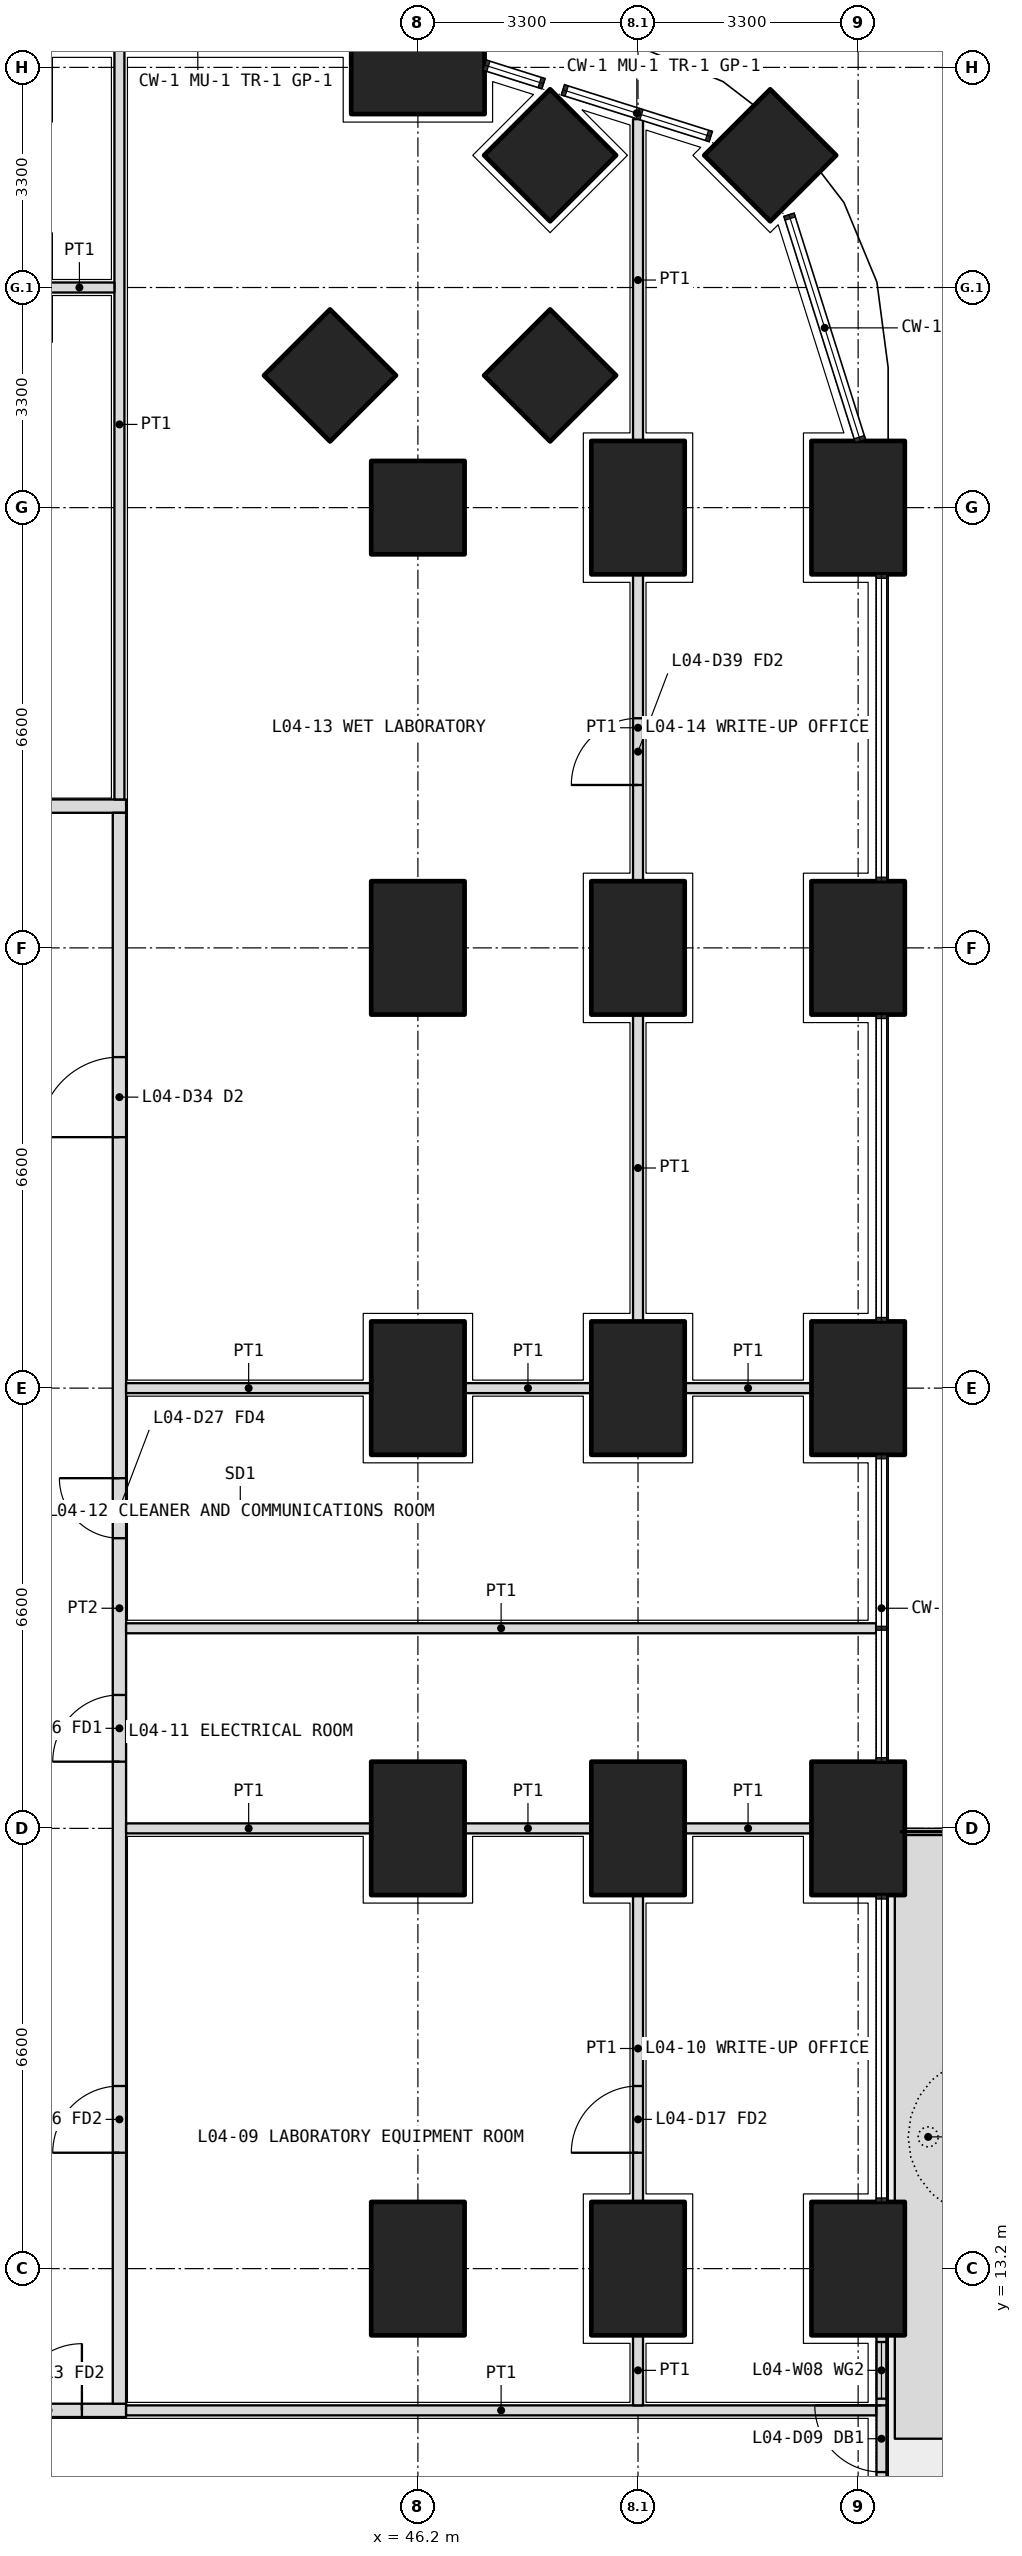
"""IFC4 building model, lengths in metres.
Left out: names, types, materials, properties, quantities, classifications, styles, units other than length and angle.
Written with IfcOpenShell. Run it as: python <this file> out.ifc"""

import sys

from ifc_helpers import new_model, si_unit, direction, frame, frame_2d, origin, origin_2d, place, context, subcontext, project, spatial, polyline, rectangle, outline, extrude, element, fill, save


model = new_model("IFC4")
c1 = context("Model", 3, precision=1e-05, world=origin(), true_north=direction((0.0, 1.0)))
c2 = subcontext(c1, "Body", "Model", "MODEL_VIEW")
j1 = project(units=[si_unit("LENGTHUNIT", "METRE"), si_unit("PLANEANGLEUNIT", "RADIAN")], contexts=[c1])
p1 = place(None, origin())
s1 = spatial("IfcSite", under=j1, at=p1, CompositionType="ELEMENT")
p2 = place(p1, origin())
s2 = spatial("IfcBuilding", under=s1, at=p2, CompositionType="ELEMENT")
p3 = place(p2, frame((0.0, 0.0, 21.3)))
s3 = spatial("IfcBuildingStorey", under=s2, at=p3, CompositionType="ELEMENT", Elevation=21.3)
p4 = place(p3, frame((51.482, 44.882, 0.0), z_axis=(0.0, 0.0, 1.0), x_axis=(0.707106781187, 0.707106781187, 0.0)))
e1 = element("IfcColumn", 1, at=p4, inside=s3, PredefinedType="COLUMN", context=c2, shape_type="SweptSolid", body=[
    extrude(rectangle(XDim=1.4, YDim=1.4, at=origin_2d()), origin(), (0.0, 0.0, 1.0), 4.2),
])
for number, where, z_axis, x_axis in (
    (2, (52.8, 13.2, 0.0), (0.0, 0.0, 1.0), (0.0, 1.0, 0.0)),
    (3, (52.8, 19.8, 0.0), (0.0, 0.0, 1.0), (0.0, 1.0, 0.0)),
    (4, (52.8, 26.4, 0.0), (0.0, 0.0, 1.0), (0.0, 1.0, 0.0)),
    (5, (52.8, 33.0, 0.0), (0.0, 0.0, 1.0), (0.0, 1.0, 0.0)),
    (6, (52.8, 39.6, 0.0), (0.0, 0.0, 1.0), (0.0, 1.0, 0.0)),
    (7, (46.2, 46.2, 0.0), (0.0, 0.0, 1.0), (1.0, 0.0, 0.0)),
):
    element("IfcColumn", number, at=place(p3, frame(where, z_axis=z_axis, x_axis=x_axis)), inside=s3, PredefinedType="COLUMN", context=c2, shape_type="SweptSolid", body=[
        extrude(rectangle(XDim=2.0, YDim=1.4, at=origin_2d()), origin(), (0.0, 0.0, 1.0), 4.2),
    ])
for number, where, z_axis, x_axis in (
    (8, (46.2, 39.6, 0.0), (0.0, 0.0, 1.0), (1.0, 0.0, 0.0)),
    (9, (48.182, 44.882, 0.0), (0.0, 0.0, 1.0), (0.707, 0.707, 0.0)),
):
    element("IfcColumn", number, at=place(p3, frame(where, z_axis=z_axis, x_axis=x_axis)), inside=s3, PredefinedType="COLUMN", context=c2, shape_type="SweptSolid", body=[
        extrude(rectangle(XDim=1.4, YDim=1.4, at=origin_2d()), origin(), (0.0, 0.0, 1.0), 4.2),
    ])
for number, where, z_axis, x_axis in (
    (10, (49.5, 13.2, 0.0), (0.0, 0.0, 1.0), (0.0, 1.0, 0.0)),
    (11, (49.5, 19.8, 0.0), (0.0, 0.0, 1.0), (0.0, 1.0, 0.0)),
    (12, (49.5, 26.4, 0.0), (0.0, 0.0, 1.0), (0.0, 1.0, 0.0)),
    (13, (49.5, 33.0, 0.0), (0.0, 0.0, 1.0), (0.0, 1.0, 0.0)),
    (14, (49.5, 39.6, 0.0), (0.0, 0.0, 1.0), (0.0, 1.0, 0.0)),
):
    element("IfcColumn", number, at=place(p3, frame(where, z_axis=z_axis, x_axis=x_axis)), inside=s3, PredefinedType="COLUMN", context=c2, shape_type="SweptSolid", body=[
        extrude(rectangle(XDim=2.0, YDim=1.4, at=origin_2d()), origin(), (0.0, 0.0, 1.0), 4.2),
    ])
for number, where, z_axis, x_axis in (
    (15, (48.182, 41.582, 0.0), (0.0, 0.0, 1.0), (0.707, 0.707, 0.0)),
    (16, (44.882, 41.582, 0.0), (0.0, 0.0, 1.0), (0.707, 0.707, 0.0)),
):
    element("IfcColumn", number, at=place(p3, frame(where, z_axis=z_axis, x_axis=x_axis)), inside=s3, PredefinedType="COLUMN", context=c2, shape_type="SweptSolid", body=[
        extrude(rectangle(XDim=1.4, YDim=1.4, at=origin_2d()), origin(), (0.0, 0.0, 1.0), 4.2),
    ])
for number, where, z_axis, x_axis in (
    (17, (46.2, 13.2, 0.0), (0.0, 0.0, 1.0), (0.0, 1.0, 0.0)),
    (18, (46.2, 19.8, 0.0), (0.0, 0.0, 1.0), (0.0, 1.0, 0.0)),
    (19, (46.2, 26.4, 0.0), (0.0, 0.0, 1.0), (0.0, 1.0, 0.0)),
    (20, (46.2, 33.0, 0.0), (0.0, 0.0, 1.0), (0.0, 1.0, 0.0)),
):
    element("IfcColumn", number, at=place(p3, frame(where, z_axis=z_axis, x_axis=x_axis)), inside=s3, PredefinedType="COLUMN", context=c2, shape_type="SweptSolid", body=[
        extrude(rectangle(XDim=2.0, YDim=1.4, at=origin_2d()), origin(), (0.0, 0.0, 1.0), 4.2),
    ])
p5 = place(p3, origin())
e21 = element("IfcWall", 21, at=p5, inside=s3, PredefinedType="USERDEFINED", context=c2, shape_type="SweptSolid", body=[
    extrude(outline(polyline([(53.35, 10.65), (54.35, 10.65), (54.35, 19.7), (53.35, 19.7), (53.35, 10.65)]), holes=[polyline([(53.5, 10.8), (54.2, 10.8), (54.2, 19.55), (53.5, 19.55), (53.5, 10.8)])]), origin(), (0.0, 0.0, 1.0), 1.05),
])
p6 = place(p3, frame((53.15, 7.6, 0.0), z_axis=(0.0, 0.0, 1.0), x_axis=(0.0, 1.0, 0.0)))
e22 = element("IfcWall", 22, at=p6, inside=s3, PredefinedType="SOLIDWALL", context=c2, shape_type="SweptSolid", body=[
    extrude(rectangle(XDim=4.6, YDim=0.15, at=frame_2d((2.3, 0.0))), origin(), (0.0, 0.0, 1.0), 2.7),
])
p7 = place(p6, frame((2.55, 0.0, 0.0)))
e23 = element("IfcOpeningElement", 23, at=p7, cuts=e22, PredefinedType="OPENING", context=c2, shape_type="SweptSolid", body=[
    extrude(rectangle(XDim=1.0, YDim=2.4, at=frame_2d((0.5, 1.2))), frame((0.0, 0.085, 0.0), z_axis=(0.0, -1.0, 0.0), x_axis=(1.0, 0.0, 0.0)), (0.0, 0.0, 1.0), 0.17),
])
p8 = place(p6, frame((0.1, 0.0, 0.1)))
e24 = element("IfcOpeningElement", 24, at=p8, cuts=e22, PredefinedType="OPENING", context=c2, shape_type="SweptSolid", body=[
    extrude(rectangle(XDim=1.95, YDim=2.3, at=frame_2d((0.975, 1.15))), frame((0.0, 0.085, 0.0), z_axis=(0.0, -1.0, 0.0), x_axis=(1.0, 0.0, 0.0)), (0.0, 0.0, 1.0), 0.17),
])
p9 = place(p6, frame((3.65, 0.0, 0.1)))
e25 = element("IfcOpeningElement", 25, at=p9, cuts=e22, PredefinedType="OPENING", context=c2, shape_type="SweptSolid", body=[
    extrude(rectangle(XDim=0.85, YDim=2.3, at=frame_2d((0.425, 1.15))), frame((0.0, 0.085, 0.0), z_axis=(0.0, -1.0, 0.0), x_axis=(1.0, 0.0, 0.0)), (0.0, 0.0, 1.0), 0.17),
])
p10 = place(p3, frame((33.0, 11.075, 0.0), z_axis=(0.0, 0.0, 1.0), x_axis=(1.0, 0.0, 0.0)))
e26 = element("IfcWall", 26, at=p10, inside=s3, PredefinedType="PARTITIONING", context=c2, shape_type="SweptSolid", body=[
    extrude(rectangle(XDim=8.825, YDim=0.2, at=frame_2d((4.413, 0.0))), origin(), (0.0, 0.0, 1.0), 2.85),
])
p11 = place(p10, frame((1.2, 0.0, 0.0)))
e27 = element("IfcOpeningElement", 27, at=p11, cuts=e26, PredefinedType="OPENING", context=c2, shape_type="SweptSolid", body=[
    extrude(rectangle(XDim=1.0, YDim=2.1, at=frame_2d((0.5, 1.05))), frame((0.0, 0.11, 0.0), z_axis=(0.0, -1.0, 0.0), x_axis=(1.0, 0.0, 0.0)), (0.0, 0.0, 1.0), 0.22),
])
p12 = place(p10, frame((4.5, 0.0, 0.0)))
e28 = element("IfcOpeningElement", 28, at=p12, cuts=e26, PredefinedType="OPENING", context=c2, shape_type="SweptSolid", body=[
    extrude(rectangle(XDim=1.0, YDim=2.1, at=frame_2d((0.5, 1.05))), frame((0.0, 0.11, 0.0), z_axis=(0.0, -1.0, 0.0), x_axis=(1.0, 0.0, 0.0)), (0.0, 0.0, 1.0), 0.22),
])
p13 = place(p10, frame((7.163, 0.0, 0.0)))
e29 = element("IfcOpeningElement", 29, at=p13, cuts=e26, PredefinedType="OPENING", context=c2, shape_type="SweptSolid", body=[
    extrude(rectangle(XDim=1.0, YDim=2.1, at=frame_2d((0.5, 1.05))), frame((0.0, 0.11, 0.0), z_axis=(0.0, -1.0, 0.0), x_axis=(1.0, 0.0, 0.0)), (0.0, 0.0, 1.0), 0.22),
])
p14 = place(p3, frame((10.975, 35.125, 0.0), z_axis=(0.0, 0.0, 1.0), x_axis=(1.0, 0.0, 0.0)))
e30 = element("IfcWall", 30, at=p14, inside=s3, PredefinedType="PARTITIONING", context=c2, shape_type="SweptSolid", body=[
    extrude(rectangle(XDim=30.85, YDim=0.2, at=frame_2d((15.425, 0.0))), origin(), (0.0, 0.0, 1.0), 2.85),
])
p15 = place(p14, frame((7.262, 0.0, 0.0)))
e31 = element("IfcOpeningElement", 31, at=p15, cuts=e30, PredefinedType="OPENING", context=c2, shape_type="SweptSolid", body=[
    extrude(rectangle(XDim=1.0, YDim=2.1, at=frame_2d((0.5, 1.05))), frame((0.0, 0.11, 0.0), z_axis=(0.0, -1.0, 0.0), x_axis=(1.0, 0.0, 0.0)), (0.0, 0.0, 1.0), 0.22),
])
p16 = place(p14, frame((22.587, 0.0, 0.0)))
e32 = element("IfcOpeningElement", 32, at=p16, cuts=e30, PredefinedType="OPENING", context=c2, shape_type="SweptSolid", body=[
    extrude(rectangle(XDim=1.0, YDim=2.1, at=frame_2d((0.5, 1.05))), frame((0.0, 0.11, 0.0), z_axis=(0.0, -1.0, 0.0), x_axis=(1.0, 0.0, 0.0)), (0.0, 0.0, 1.0), 0.22),
])
p17 = place(p3, frame((41.725, 11.175, 0.0), z_axis=(0.0, 0.0, 1.0), x_axis=(0.0, 1.0, 0.0)))
e33 = element("IfcWall", 33, at=p17, inside=s3, PredefinedType="PARTITIONING", context=c2, shape_type="SweptSolid", body=[
    extrude(rectangle(XDim=23.85, YDim=0.2, at=frame_2d((11.925, 0.0))), origin(), (0.0, 0.0, 1.0), 2.85),
])
p18 = place(p17, frame((3.762, 0.0, 0.0)))
e34 = element("IfcOpeningElement", 34, at=p18, cuts=e33, PredefinedType="OPENING", context=c2, shape_type="SweptSolid", body=[
    extrude(rectangle(XDim=1.0, YDim=2.1, at=frame_2d((0.5, 1.05))), frame((0.0, 0.11, 0.0), z_axis=(0.0, -1.0, 0.0), x_axis=(1.0, 0.0, 0.0)), (0.0, 0.0, 1.0), 0.22),
])
p19 = place(p17, frame((9.625, 0.0, 0.0)))
e35 = element("IfcOpeningElement", 35, at=p19, cuts=e33, PredefinedType="OPENING", context=c2, shape_type="SweptSolid", body=[
    extrude(rectangle(XDim=1.0, YDim=2.1, at=frame_2d((0.5, 1.05))), frame((0.0, 0.11, 0.0), z_axis=(0.0, -1.0, 0.0), x_axis=(1.0, 0.0, 0.0)), (0.0, 0.0, 1.0), 0.22),
])
p20 = place(p17, frame((12.975, 0.0, 0.0)))
e36 = element("IfcOpeningElement", 36, at=p20, cuts=e33, PredefinedType="OPENING", context=c2, shape_type="SweptSolid", body=[
    extrude(rectangle(XDim=0.9, YDim=2.1, at=frame_2d((0.45, 1.05))), frame((0.0, 0.11, 0.0), z_axis=(0.0, -1.0, 0.0), x_axis=(1.0, 0.0, 0.0)), (0.0, 0.0, 1.0), 0.22),
])
p21 = place(p17, frame((18.988, 0.0, 0.0)))
e37 = element("IfcOpeningElement", 37, at=p21, cuts=e33, PredefinedType="OPENING", context=c2, shape_type="SweptSolid", body=[
    extrude(rectangle(XDim=1.2, YDim=2.1, at=frame_2d((0.6, 1.05))), frame((0.0, 0.11, 0.0), z_axis=(0.0, -1.0, 0.0), x_axis=(1.0, 0.0, 0.0)), (0.0, 0.0, 1.0), 0.22),
])
p22 = place(p3, frame((53.07, 11.075, 0.0), z_axis=(0.0, 0.0, 1.0), x_axis=(-1.0, 0.0, 0.0)))
e38 = element("IfcWall", 38, at=p22, inside=s3, PredefinedType="PARTITIONING", context=c2, shape_type="SweptSolid", body=[
    extrude(rectangle(XDim=11.245, YDim=0.15, at=frame_2d((5.623, 0.0))), origin(), (0.0, 0.0, 1.0), 2.7),
])
p23 = place(p3, frame((41.725, 46.47, 0.0), z_axis=(0.0, 0.0, 1.0), x_axis=(0.0, -1.0, 0.0)))
e39 = element("IfcWall", 39, at=p23, inside=s3, PredefinedType="PARTITIONING", context=c2, shape_type="SweptSolid", body=[
    extrude(rectangle(XDim=11.245, YDim=0.15, at=frame_2d((5.623, 0.0))), origin(), (0.0, 0.0, 1.0), 2.7),
])
p24 = place(p3, frame((49.5, 11.15, 0.0), z_axis=(0.0, 0.0, 1.0), x_axis=(0.0, 1.0, 0.0)))
e40 = element("IfcWall", 40, at=p24, inside=s3, PredefinedType="PARTITIONING", context=c2, shape_type="SweptSolid", body=[
    extrude(rectangle(XDim=1.05, YDim=0.15, at=frame_2d((0.525, 0.0))), origin(), (0.0, 0.0, 1.0), 3.9),
])
p25 = place(p3, frame((49.5, 14.2, 0.0), z_axis=(0.0, 0.0, 1.0), x_axis=(0.0, 1.0, 0.0)))
e41 = element("IfcWall", 41, at=p25, inside=s3, PredefinedType="PARTITIONING", context=c2, shape_type="SweptSolid", body=[
    extrude(rectangle(XDim=4.6, YDim=0.15, at=frame_2d((2.3, 0.0))), origin(), (0.0, 0.0, 1.0), 3.9),
])
p26 = place(p25, frame((0.738, 0.0, 0.0)))
e42 = element("IfcOpeningElement", 42, at=p26, cuts=e41, PredefinedType="OPENING", context=c2, shape_type="SweptSolid", body=[
    extrude(rectangle(XDim=1.0, YDim=2.1, at=frame_2d((0.5, 1.05))), frame((0.0, 0.085, 0.0), z_axis=(0.0, -1.0, 0.0), x_axis=(1.0, 0.0, 0.0)), (0.0, 0.0, 1.0), 0.17),
])
p27 = place(p3, frame((49.5, 27.4, 0.0), z_axis=(0.0, 0.0, 1.0), x_axis=(0.0, 1.0, 0.0)))
e43 = element("IfcWall", 43, at=p27, inside=s3, PredefinedType="PARTITIONING", context=c2, shape_type="SweptSolid", body=[
    extrude(rectangle(XDim=4.6, YDim=0.15, at=frame_2d((2.3, 0.0))), origin(), (0.0, 0.0, 1.0), 3.9),
])
p28 = place(p3, frame((49.5, 34.0, 0.0), z_axis=(0.0, 0.0, 1.0), x_axis=(0.0, 1.0, 0.0)))
e44 = element("IfcWall", 44, at=p28, inside=s3, PredefinedType="PARTITIONING", context=c2, shape_type="SweptSolid", body=[
    extrude(rectangle(XDim=4.6, YDim=0.15, at=frame_2d((2.3, 0.0))), origin(), (0.0, 0.0, 1.0), 3.9),
])
p29 = place(p28, frame((1.442, 0.0, 0.0)))
e45 = element("IfcOpeningElement", 45, at=p29, cuts=e44, PredefinedType="OPENING", context=c2, shape_type="SweptSolid", body=[
    extrude(rectangle(XDim=1.0, YDim=2.1, at=frame_2d((0.5, 1.05))), frame((0.0, 0.085, 0.0), z_axis=(0.0, -1.0, 0.0), x_axis=(1.0, 0.0, 0.0)), (0.0, 0.0, 1.0), 0.17),
])
p30 = place(p3, frame((49.5, 40.6, 0.0), z_axis=(0.0, 0.0, 1.0), x_axis=(0.0, 1.0, 0.0)))
e46 = element("IfcWall", 46, at=p30, inside=s3, PredefinedType="PARTITIONING", context=c2, shape_type="SweptSolid", body=[
    extrude(rectangle(XDim=4.824, YDim=0.15, at=frame_2d((2.412, 0.0))), origin(), (0.0, 0.0, 1.0), 2.7),
])
p31 = place(p3, frame((53.07, 22.8, 0.0), z_axis=(0.0, 0.0, 1.0), x_axis=(-1.0, 0.0, 0.0)))
e47 = element("IfcWall", 47, at=p31, inside=s3, PredefinedType="PARTITIONING", context=c2, shape_type="SweptSolid", body=[
    extrude(rectangle(XDim=11.245, YDim=0.15, at=frame_2d((5.623, 0.0))), origin(), (0.0, 0.0, 1.0), 2.7),
])
for number, where, z_axis, x_axis in (
    (48, (52.1, 26.4, 0.0), (0.0, 0.0, 1.0), (-1.0, 0.0, 0.0)),
    (49, (48.8, 26.4, 0.0), (0.0, 0.0, 1.0), (-1.0, 0.0, 0.0)),
):
    element("IfcWall", number, at=place(p3, frame(where, z_axis=z_axis, x_axis=x_axis)), inside=s3, PredefinedType="PARTITIONING", context=c2, shape_type="SweptSolid", body=[
        extrude(rectangle(XDim=1.9, YDim=0.15, at=frame_2d((0.95, 0.0))), origin(), (0.0, 0.0, 1.0), 2.85),
    ])
p32 = place(p3, frame((45.5, 26.4, 0.0), z_axis=(0.0, 0.0, 1.0), x_axis=(-1.0, 0.0, 0.0)))
e50 = element("IfcWall", 50, at=p32, inside=s3, PredefinedType="PARTITIONING", context=c2, shape_type="SweptSolid", body=[
    extrude(rectangle(XDim=3.675, YDim=0.15, at=frame_2d((1.837, 0.0))), origin(), (0.0, 0.0, 1.0), 2.85),
])
for number, where, z_axis, x_axis in (
    (51, (52.1, 19.8, 0.0), (0.0, 0.0, 1.0), (-1.0, 0.0, 0.0)),
    (52, (48.8, 19.8, 0.0), (0.0, 0.0, 1.0), (-1.0, 0.0, 0.0)),
):
    element("IfcWall", number, at=place(p3, frame(where, z_axis=z_axis, x_axis=x_axis)), inside=s3, PredefinedType="PARTITIONING", context=c2, shape_type="SweptSolid", body=[
        extrude(rectangle(XDim=1.9, YDim=0.15, at=frame_2d((0.95, 0.0))), origin(), (0.0, 0.0, 1.0), 2.85),
    ])
p33 = place(p3, frame((45.5, 19.8, 0.0), z_axis=(0.0, 0.0, 1.0), x_axis=(-1.0, 0.0, 0.0)))
e53 = element("IfcWall", 53, at=p33, inside=s3, PredefinedType="PARTITIONING", context=c2, shape_type="SweptSolid", body=[
    extrude(rectangle(XDim=3.675, YDim=0.15, at=frame_2d((1.837, 0.0))), origin(), (0.0, 0.0, 1.0), 2.85),
])
p34 = place(p3, frame((41.65, 42.9, 0.0), z_axis=(0.0, 0.0, 1.0), x_axis=(-1.0, 0.0, 0.0)))
e54 = element("IfcWall", 54, at=p34, inside=s3, PredefinedType="PARTITIONING", context=c2, shape_type="SweptSolid", body=[
    extrude(rectangle(XDim=1.05, YDim=0.15, at=frame_2d((0.525, 0.0))), origin(), (0.0, 0.0, 1.0), 3.9),
])
p35 = place(p7, origin())
e55 = element("IfcDoor", 55, at=p35, inside=s3, OperationType="SINGLE_SWING_RIGHT", PredefinedType="DOOR", context=c2, shape_type="SweptSolid", body=[
    extrude(rectangle(XDim=1.0, YDim=2.4, at=frame_2d((0.5, 1.2))), frame((0.0, 0.025, 0.0), z_axis=(0.0, -1.0, 0.0), x_axis=(1.0, 0.0, 0.0)), (0.0, 0.0, 1.0), 0.05),
])
fill(e23, e55)
p36 = place(p9, origin())
e56 = element("IfcWindow", 56, at=p36, inside=s3, PartitioningType="SINGLE_PANEL", PredefinedType="WINDOW", context=c2, shape_type="SweptSolid", body=[
    extrude(rectangle(XDim=0.85, YDim=2.3, at=frame_2d((0.425, 1.15))), frame((0.0, 0.03, 0.0), z_axis=(0.0, -1.0, 0.0), x_axis=(1.0, 0.0, 0.0)), (0.0, 0.0, 1.0), 0.06),
])
fill(e25, e56)
p37 = place(p13, origin())
e57 = element("IfcDoor", 57, at=p37, inside=s3, OperationType="SINGLE_SWING_RIGHT", PredefinedType="DOOR", context=c2, shape_type="SweptSolid", body=[
    extrude(rectangle(XDim=1.0, YDim=2.1, at=frame_2d((0.5, 1.05))), frame((0.0, 0.025, 0.0), z_axis=(0.0, -1.0, 0.0), x_axis=(1.0, 0.0, 0.0)), (0.0, 0.0, 1.0), 0.05),
])
fill(e29, e57)
p38 = place(p18, origin())
e58 = element("IfcDoor", 58, at=p38, inside=s3, OperationType="SINGLE_SWING_LEFT", PredefinedType="DOOR", context=c2, shape_type="SweptSolid", body=[
    extrude(rectangle(XDim=1.0, YDim=2.1, at=frame_2d((0.5, 1.05))), frame((0.0, 0.025, 0.0), z_axis=(0.0, -1.0, 0.0), x_axis=(1.0, 0.0, 0.0)), (0.0, 0.0, 1.0), 0.05),
])
fill(e34, e58)
p39 = place(p26, origin())
e59 = element("IfcDoor", 59, at=p39, inside=s3, OperationType="SINGLE_SWING_LEFT", PredefinedType="DOOR", context=c2, shape_type="SweptSolid", body=[
    extrude(rectangle(XDim=1.0, YDim=2.1, at=frame_2d((0.5, 1.05))), frame((0.0, 0.025, 0.0), z_axis=(0.0, -1.0, 0.0), x_axis=(1.0, 0.0, 0.0)), (0.0, 0.0, 1.0), 0.05),
])
fill(e42, e59)
p40 = place(p19, origin())
e60 = element("IfcDoor", 60, at=p40, inside=s3, OperationType="SINGLE_SWING_LEFT", PredefinedType="DOOR", context=c2, shape_type="SweptSolid", body=[
    extrude(rectangle(XDim=1.0, YDim=2.1, at=frame_2d((0.5, 1.05))), frame((0.0, 0.025, 0.0), z_axis=(0.0, -1.0, 0.0), x_axis=(1.0, 0.0, 0.0)), (0.0, 0.0, 1.0), 0.05),
])
fill(e35, e60)
p41 = place(p20, origin())
e61 = element("IfcDoor", 61, at=p41, inside=s3, OperationType="SINGLE_SWING_RIGHT", PredefinedType="DOOR", context=c2, shape_type="SweptSolid", body=[
    extrude(rectangle(XDim=0.9, YDim=2.1, at=frame_2d((0.45, 1.05))), frame((0.0, 0.025, 0.0), z_axis=(0.0, -1.0, 0.0), x_axis=(1.0, 0.0, 0.0)), (0.0, 0.0, 1.0), 0.05),
])
fill(e36, e61)
p42 = place(p21, origin())
e62 = element("IfcDoor", 62, at=p42, inside=s3, OperationType="DOUBLE_DOOR_SINGLE_SWING", PredefinedType="DOOR", context=c2, shape_type="SweptSolid", body=[
    extrude(rectangle(XDim=1.2, YDim=2.1, at=frame_2d((0.6, 1.05))), frame((0.0, 0.025, 0.0), z_axis=(0.0, -1.0, 0.0), x_axis=(1.0, 0.0, 0.0)), (0.0, 0.0, 1.0), 0.05),
])
fill(e37, e62)
p43 = place(p29, origin())
e63 = element("IfcDoor", 63, at=p43, inside=s3, OperationType="SINGLE_SWING_LEFT", PredefinedType="DOOR", context=c2, shape_type="SweptSolid", body=[
    extrude(rectangle(XDim=1.0, YDim=2.1, at=frame_2d((0.5, 1.05))), frame((0.0, 0.025, 0.0), z_axis=(0.0, -1.0, 0.0), x_axis=(1.0, 0.0, 0.0)), (0.0, 0.0, 1.0), 0.05),
])
fill(e45, e63)
save(model, sys.argv[1])
